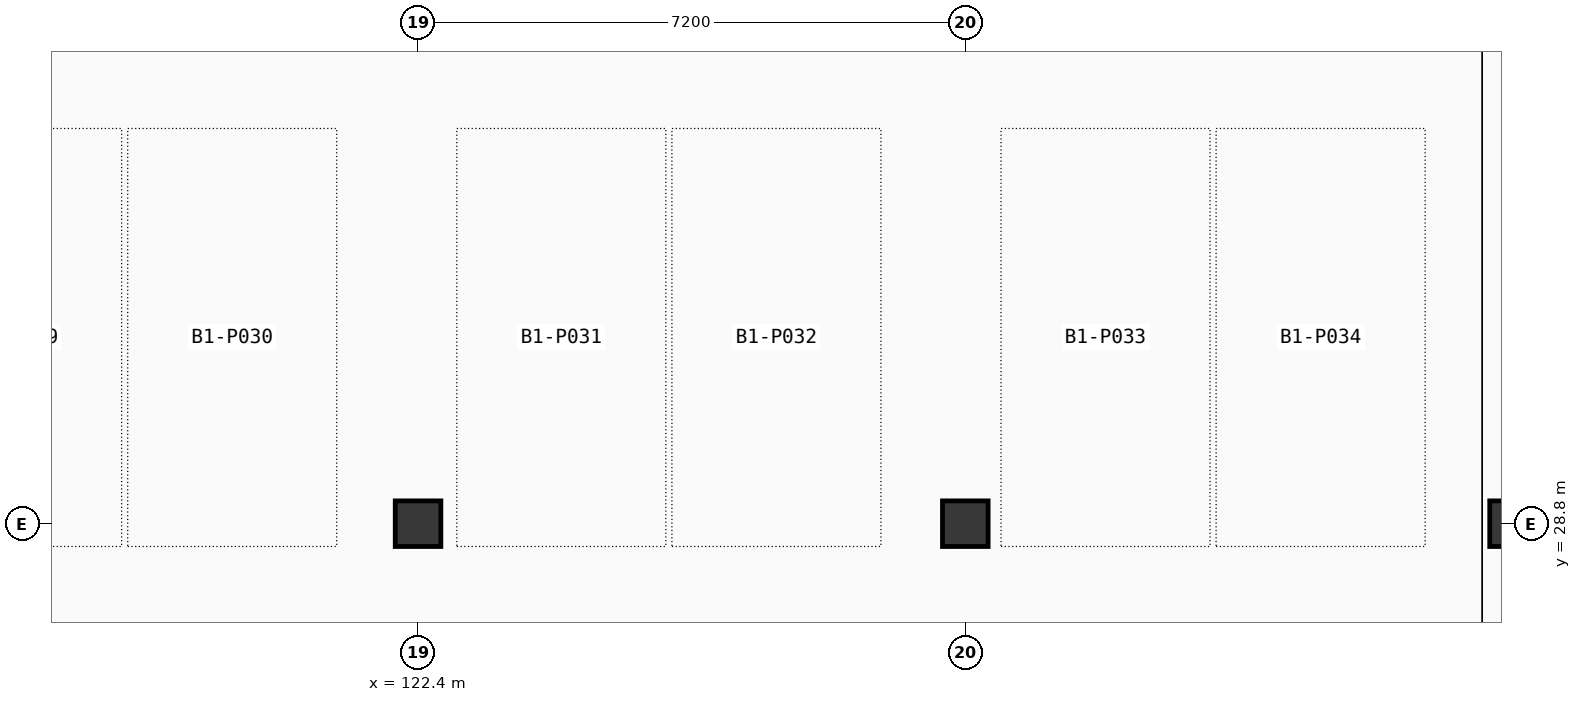
"""IFC4 building model, lengths in metres.
Left out: names, types, materials, properties, quantities, classifications, styles, units other than length and angle.
Written with IfcOpenShell. Run it as: python <this file> out.ifc"""

import sys

from ifc_helpers import new_model, si_unit, direction, frame, origin, origin_2d, place, context, subcontext, project, spatial, rectangle, extrude, element, save


model = new_model("IFC4")
c1 = context("Model", 3, precision=1e-05, world=origin(), true_north=direction((0.0, 1.0)))
c2 = subcontext(c1, "Body", "Model", "MODEL_VIEW")
j1 = project(units=[si_unit("LENGTHUNIT", "METRE"), si_unit("PLANEANGLEUNIT", "RADIAN")], contexts=[c1])
p1 = place(None, origin())
s1 = spatial("IfcSite", under=j1, at=p1, CompositionType="ELEMENT")
p2 = place(p1, origin())
s2 = spatial("IfcBuilding", under=s1, at=p2, CompositionType="ELEMENT")
p3 = place(p2, frame((0.0, 0.0, -4.2)))
s3 = spatial("IfcBuildingStorey", under=s2, at=p3, CompositionType="ELEMENT", Elevation=-4.2)
for number, where, z_axis, x_axis in (
    (1, (122.4, 28.8, 0.0), (0.0, 0.0, 1.0), (1.0, 0.0, 0.0)),
    (2, (129.6, 28.8, 0.0), (0.0, 0.0, 1.0), (1.0, 0.0, 0.0)),
    (3, (136.8, 28.8, 0.0), (0.0, 0.0, 1.0), (1.0, 0.0, 0.0)),
):
    element("IfcColumn", number, at=place(p3, frame(where, z_axis=z_axis, x_axis=x_axis)), inside=s3, PredefinedType="COLUMN", context=c2, shape_type="SweptSolid", body=[
        extrude(rectangle(XDim=0.6, YDim=0.6, at=origin_2d()), origin(), (0.0, 0.0, 1.0), 4.2),
    ])
save(model, sys.argv[1])
